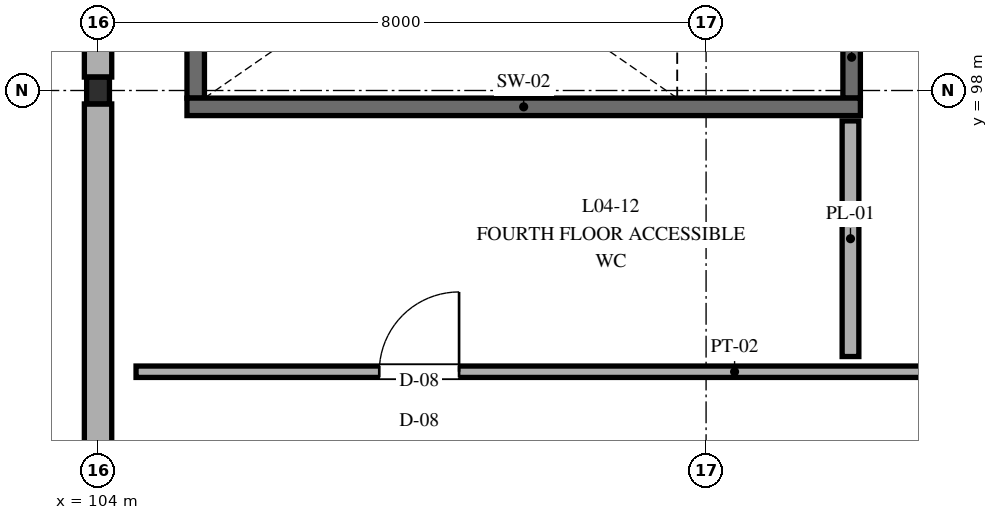
"""IFC4 building model, lengths in metres.
Left out: names, types, materials, properties, quantities, classifications, styles, units other than length and angle.
Written with IfcOpenShell. Run it as: python <this file> out.ifc"""

import sys

from ifc_helpers import new_model, si_unit, direction, frame, frame_2d, origin, origin_2d, place, context, subcontext, project, spatial, rectangle, i_section, extrude, element, fill, save


model = new_model("IFC4")
c1 = context("Model", 3, precision=1e-05, world=origin(), true_north=direction((0.0, 1.0)))
c2 = subcontext(c1, "Body", "Model", "MODEL_VIEW")
j1 = project(units=[si_unit("LENGTHUNIT", "METRE"), si_unit("PLANEANGLEUNIT", "RADIAN")], contexts=[c1])
p1 = place(None, origin())
s1 = spatial("IfcSite", under=j1, at=p1, CompositionType="ELEMENT")
p2 = place(p1, origin())
s2 = spatial("IfcBuilding", under=s1, at=p2, CompositionType="ELEMENT")
p3 = place(p2, frame((0.0, 0.0, 18.6)))
s3 = spatial("IfcBuildingStorey", under=s2, at=p3, CompositionType="ELEMENT", Elevation=18.6)
p4 = place(p3, frame((104.0, 98.0, 0.0), z_axis=(0.0, 0.0, 1.0), x_axis=(1.0, 0.0, 0.0)))
e1 = element("IfcColumn", 1, at=p4, inside=s3, PredefinedType="COLUMN", context=c2, shape_type="SweptSolid", body=[
    extrude(i_section(OverallWidth=0.3, OverallDepth=0.35, WebThickness=0.01, FlangeThickness=0.018, FilletRadius=0.027, at=origin_2d()), origin(), (0.0, 0.0, 1.0), 3.6),
])
for number, where, z_axis, x_axis in (
    (2, (104.0, 97.823, 0.0), (0.0, 0.0, 1.0), (0.0, -1.0, 0.0)),
    (3, (104.0, 105.823, 0.0), (0.0, 0.0, 1.0), (0.0, -1.0, 0.0)),
):
    element("IfcWall", number, at=place(p3, frame(where, z_axis=z_axis, x_axis=x_axis)), inside=s3, PredefinedType="STANDARD", context=c2, shape_type="SweptSolid", body=[
        extrude(rectangle(XDim=7.646, YDim=0.36, at=frame_2d((3.823, 0.0))), origin(), (0.0, 0.0, 1.0), 3.05),
    ])
p5 = place(p3, frame((113.915, 97.9, 0.0), z_axis=(0.0, 0.0, 1.0), x_axis=(0.0, 1.0, 0.0)))
e4 = element("IfcWall", 4, at=p5, inside=s3, PredefinedType="SHEAR", context=c2, shape_type="SweptSolid", body=[
    extrude(rectangle(XDim=4.3, YDim=0.23, at=frame_2d((2.15, 0.0))), origin(), (0.0, 0.0, 1.0), 3.6),
])
p6 = place(p5, frame((1.425, 0.0, 0.0)))
e5 = element("IfcOpeningElement", 5, at=p6, cuts=e4, PredefinedType="OPENING", context=c2, shape_type="SweptSolid", body=[
    extrude(rectangle(XDim=1.45, YDim=2.2, at=frame_2d((0.725, 1.1))), frame((0.0, 0.125, 0.0), z_axis=(0.0, -1.0, 0.0), x_axis=(1.0, 0.0, 0.0)), (0.0, 0.0, 1.0), 0.25),
])
p7 = place(p3, frame((105.285, 102.2, 0.0), z_axis=(0.0, 0.0, 1.0), x_axis=(0.0, -1.0, 0.0)))
e6 = element("IfcWall", 6, at=p7, inside=s3, PredefinedType="SHEAR", context=c2, shape_type="SweptSolid", body=[
    extrude(rectangle(XDim=4.3, YDim=0.23, at=frame_2d((2.15, 0.0))), origin(), (0.0, 0.0, 1.0), 3.6),
])
p8 = place(p3, frame((105.17, 97.785, 0.0), z_axis=(0.0, 0.0, 1.0), x_axis=(1.0, 0.0, 0.0)))
e7 = element("IfcWall", 7, at=p8, inside=s3, PredefinedType="SHEAR", context=c2, shape_type="SweptSolid", body=[
    extrude(rectangle(XDim=8.86, YDim=0.23, at=frame_2d((4.43, 0.0))), origin(), (0.0, 0.0, 1.0), 3.6),
])
p9 = place(p3, frame((104.5, 94.3, 0.0), z_axis=(0.0, 0.0, 1.0), x_axis=(1.0, 0.0, 0.0)))
e8 = element("IfcWall", 8, at=p9, inside=s3, PredefinedType="PARTITIONING", context=c2, shape_type="SweptSolid", body=[
    extrude(rectangle(XDim=31.0, YDim=0.15, at=frame_2d((15.5, 0.0))), origin(), (0.0, 0.0, 1.0), 3.05),
])
p10 = place(p9, frame((3.2, 0.0, 0.0)))
e9 = element("IfcOpeningElement", 9, at=p10, cuts=e8, PredefinedType="OPENING", context=c2, shape_type="SweptSolid", body=[
    extrude(rectangle(XDim=1.05, YDim=2.15, at=frame_2d((0.525, 1.075))), frame((0.0, 0.085, 0.0), z_axis=(0.0, -1.0, 0.0), x_axis=(1.0, 0.0, 0.0)), (0.0, 0.0, 1.0), 0.17),
])
p11 = place(p9, frame((11.5, 0.0, 0.0)))
e10 = element("IfcOpeningElement", 10, at=p11, cuts=e8, PredefinedType="OPENING", context=c2, shape_type="SweptSolid", body=[
    extrude(rectangle(XDim=1.6, YDim=2.2, at=frame_2d((0.8, 1.1))), frame((0.0, 0.085, 0.0), z_axis=(0.0, -1.0, 0.0), x_axis=(1.0, 0.0, 0.0)), (0.0, 0.0, 1.0), 0.17),
])
p12 = place(p9, frame((18.5, 0.0, 0.0)))
e11 = element("IfcOpeningElement", 11, at=p12, cuts=e8, PredefinedType="OPENING", context=c2, shape_type="SweptSolid", body=[
    extrude(rectangle(XDim=1.6, YDim=2.2, at=frame_2d((0.8, 1.1))), frame((0.0, 0.085, 0.0), z_axis=(0.0, -1.0, 0.0), x_axis=(1.0, 0.0, 0.0)), (0.0, 0.0, 1.0), 0.17),
])
p13 = place(p9, frame((26.5, 0.0, 0.0)))
e12 = element("IfcOpeningElement", 12, at=p13, cuts=e8, PredefinedType="OPENING", context=c2, shape_type="SweptSolid", body=[
    extrude(rectangle(XDim=1.0, YDim=2.15, at=frame_2d((0.5, 1.075))), frame((0.0, 0.085, 0.0), z_axis=(0.0, -1.0, 0.0), x_axis=(1.0, 0.0, 0.0)), (0.0, 0.0, 1.0), 0.17),
])
p14 = place(p3, frame((113.9, 94.5, 0.0), z_axis=(0.0, 0.0, 1.0), x_axis=(0.0, 1.0, 0.0)))
e13 = element("IfcWall", 13, at=p14, inside=s3, PredefinedType="PLUMBINGWALL", context=c2, shape_type="SweptSolid", body=[
    extrude(rectangle(XDim=3.1, YDim=0.22, at=frame_2d((1.55, 0.0))), origin(), (0.0, 0.0, 1.0), 3.05),
])
p15 = place(p10, origin())
e14 = element("IfcDoor", 14, at=p15, inside=s3, OperationType="SINGLE_SWING_RIGHT", PredefinedType="DOOR", context=c2, shape_type="SweptSolid", body=[
    extrude(rectangle(XDim=1.05, YDim=2.15, at=frame_2d((0.525, 1.075))), frame((0.0, 0.025, 0.0), z_axis=(0.0, -1.0, 0.0), x_axis=(1.0, 0.0, 0.0)), (0.0, 0.0, 1.0), 0.05),
])
fill(e9, e14)
save(model, sys.argv[1])
